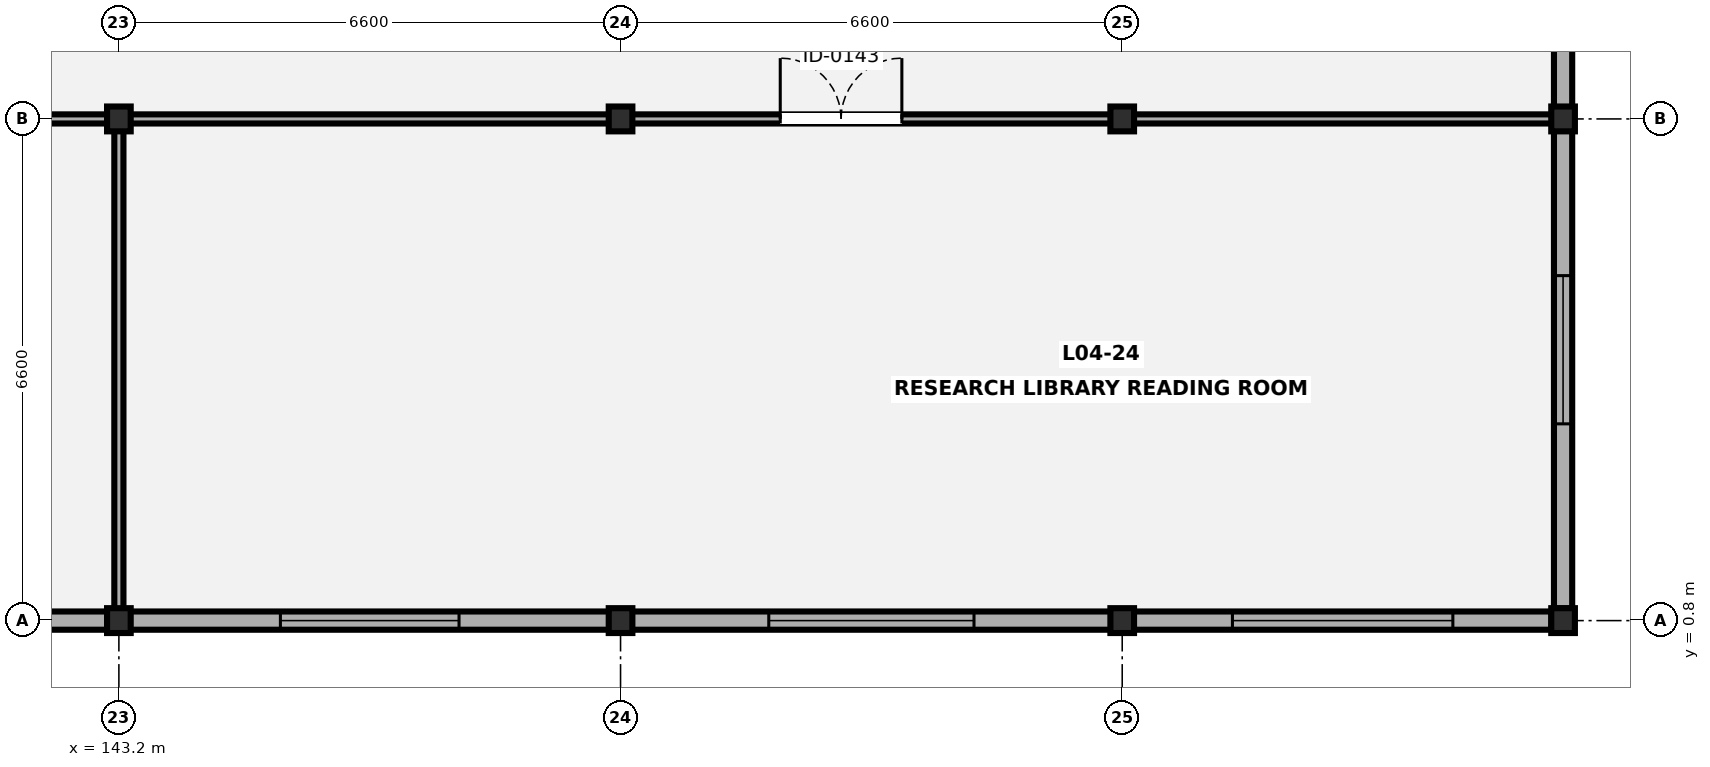
"""IFC4 building model, lengths in metres.
Left out: names, types, materials, properties, quantities, classifications, styles, units other than length and angle.
Written with IfcOpenShell. Run it as: python <this file> out.ifc"""

import sys

from ifc_helpers import new_model, si_unit, direction, frame, frame_2d, origin, origin_2d, place, context, subcontext, project, spatial, rectangle, i_section, extrude, element, fill, save


model = new_model("IFC4")
c1 = context("Model", 3, precision=1e-05, world=origin(), true_north=direction((0.0, 1.0)))
c2 = subcontext(c1, "Body", "Model", "MODEL_VIEW")
j1 = project(units=[si_unit("LENGTHUNIT", "METRE"), si_unit("PLANEANGLEUNIT", "RADIAN")], contexts=[c1])
p1 = place(None, origin())
s1 = spatial("IfcSite", under=j1, at=p1, CompositionType="ELEMENT")
p2 = place(p1, origin())
s2 = spatial("IfcBuilding", under=s1, at=p2, CompositionType="ELEMENT")
p3 = place(p2, frame((0.0, 0.0, 17.5)))
s3 = spatial("IfcBuildingStorey", under=s2, at=p3, CompositionType="ELEMENT", Elevation=17.5)
for number, where, z_axis, x_axis in (
    (1, (143.2, 0.8, 0.0), (0.0, 0.0, 1.0), (1.0, 0.0, 0.0)),
    (2, (143.2, 7.4, 0.0), (0.0, 0.0, 1.0), (1.0, 0.0, 0.0)),
    (3, (149.8, 0.8, 0.0), (0.0, 0.0, 1.0), (1.0, 0.0, 0.0)),
    (4, (149.8, 7.4, 0.0), (0.0, 0.0, 1.0), (1.0, 0.0, 0.0)),
    (5, (156.4, 0.8, 0.0), (0.0, 0.0, 1.0), (1.0, 0.0, 0.0)),
    (6, (156.4, 7.4, 0.0), (0.0, 0.0, 1.0), (1.0, 0.0, 0.0)),
    (7, (162.2, 0.8, 0.0), (0.0, 0.0, 1.0), (1.0, 0.0, 0.0)),
    (8, (162.2, 7.4, 0.0), (0.0, 0.0, 1.0), (1.0, 0.0, 0.0)),
):
    element("IfcColumn", number, at=place(p3, frame(where, z_axis=z_axis, x_axis=x_axis)), inside=s3, PredefinedType="COLUMN", context=c2, shape_type="SweptSolid", body=[
        extrude(i_section(OverallWidth=0.311, OverallDepth=0.327, WebThickness=0.016, FlangeThickness=0.025, FilletRadius=0.017, at=origin_2d()), origin(), (0.0, 0.0, 1.0), 4.2),
    ])
p4 = place(p3, frame((162.2, 20.438, 0.0), z_axis=(0.0, 0.0, 1.0), x_axis=(0.0, -1.0, 0.0)))
e9 = element("IfcWall", 9, at=p4, inside=s3, PredefinedType="SOLIDWALL", context=c2, shape_type="SweptSolid", body=[
    extrude(rectangle(XDim=19.477, YDim=0.24, at=frame_2d((9.739, 0.0))), origin(), (0.0, 0.0, 1.0), 3.372),
])
p5 = place(p4, frame((2.4, 0.0, 0.85)))
e10 = element("IfcOpeningElement", 10, at=p5, cuts=e9, PredefinedType="OPENING", context=c2, shape_type="SweptSolid", body=[
    extrude(rectangle(XDim=1.55, YDim=1.4, at=frame_2d((0.775, 0.7))), frame((0.0, 0.13, 0.0), z_axis=(0.0, -1.0, 0.0), x_axis=(1.0, 0.0, 0.0)), (0.0, 0.0, 1.0), 0.26),
])
p6 = place(p4, frame((15.1, 0.0, 0.85)))
e11 = element("IfcOpeningElement", 11, at=p6, cuts=e9, PredefinedType="OPENING", context=c2, shape_type="SweptSolid", body=[
    extrude(rectangle(XDim=1.95, YDim=1.5, at=frame_2d((0.975, 0.75))), frame((0.0, 0.13, 0.0), z_axis=(0.0, -1.0, 0.0), x_axis=(1.0, 0.0, 0.0)), (0.0, 0.0, 1.0), 0.26),
])
p7 = place(p3, frame((162.046, 0.8, 0.0), z_axis=(0.0, 0.0, 1.0), x_axis=(-1.0, 0.0, 0.0)))
e12 = element("IfcWall", 12, at=p7, inside=s3, PredefinedType="SOLIDWALL", context=c2, shape_type="SweptSolid", body=[
    extrude(rectangle(XDim=58.293, YDim=0.24, at=frame_2d((29.146, 0.0))), origin(), (0.0, 0.0, 1.0), 3.505),
])
p8 = place(p7, frame((53.896, 0.0, 0.85)))
e13 = element("IfcOpeningElement", 13, at=p8, cuts=e12, PredefinedType="OPENING", context=c2, shape_type="SweptSolid", body=[
    extrude(rectangle(XDim=2.5, YDim=1.25, at=frame_2d((1.25, 0.625))), frame((0.0, 0.13, 0.0), z_axis=(0.0, -1.0, 0.0), x_axis=(1.0, 0.0, 0.0)), (0.0, 0.0, 1.0), 0.26),
])
p9 = place(p7, frame((48.096, 0.0, 0.85)))
e14 = element("IfcOpeningElement", 14, at=p9, cuts=e12, PredefinedType="OPENING", context=c2, shape_type="SweptSolid", body=[
    extrude(rectangle(XDim=0.9, YDim=1.35, at=frame_2d((0.45, 0.675))), frame((0.0, 0.13, 0.0), z_axis=(0.0, -1.0, 0.0), x_axis=(1.0, 0.0, 0.0)), (0.0, 0.0, 1.0), 0.26),
])
p10 = place(p7, frame((41.421, 0.0, 0.85)))
e15 = element("IfcOpeningElement", 15, at=p10, cuts=e12, PredefinedType="OPENING", context=c2, shape_type="SweptSolid", body=[
    extrude(rectangle(XDim=1.05, YDim=1.35, at=frame_2d((0.525, 0.675))), frame((0.0, 0.13, 0.0), z_axis=(0.0, -1.0, 0.0), x_axis=(1.0, 0.0, 0.0)), (0.0, 0.0, 1.0), 0.26),
])
p11 = place(p7, frame((34.671, 0.0, 0.85)))
e16 = element("IfcOpeningElement", 16, at=p11, cuts=e12, PredefinedType="OPENING", context=c2, shape_type="SweptSolid", body=[
    extrude(rectangle(XDim=1.35, YDim=1.5, at=frame_2d((0.675, 0.75))), frame((0.0, 0.13, 0.0), z_axis=(0.0, -1.0, 0.0), x_axis=(1.0, 0.0, 0.0)), (0.0, 0.0, 1.0), 0.26),
])
p12 = place(p7, frame((27.947, 0.0, 0.85)))
e17 = element("IfcOpeningElement", 17, at=p12, cuts=e12, PredefinedType="OPENING", context=c2, shape_type="SweptSolid", body=[
    extrude(rectangle(XDim=1.6, YDim=1.5, at=frame_2d((0.8, 0.75))), frame((0.0, 0.13, 0.0), z_axis=(0.0, -1.0, 0.0), x_axis=(1.0, 0.0, 0.0)), (0.0, 0.0, 1.0), 0.26),
])
p13 = place(p7, frame((21.171, 0.0, 0.85)))
e18 = element("IfcOpeningElement", 18, at=p13, cuts=e12, PredefinedType="OPENING", context=c2, shape_type="SweptSolid", body=[
    extrude(rectangle(XDim=1.95, YDim=1.5, at=frame_2d((0.975, 0.75))), frame((0.0, 0.13, 0.0), z_axis=(0.0, -1.0, 0.0), x_axis=(1.0, 0.0, 0.0)), (0.0, 0.0, 1.0), 0.26),
])
p14 = place(p7, frame((14.372, 0.0, 0.85)))
e19 = element("IfcOpeningElement", 19, at=p14, cuts=e12, PredefinedType="OPENING", context=c2, shape_type="SweptSolid", body=[
    extrude(rectangle(XDim=2.35, YDim=1.5, at=frame_2d((1.175, 0.75))), frame((0.0, 0.13, 0.0), z_axis=(0.0, -1.0, 0.0), x_axis=(1.0, 0.0, 0.0)), (0.0, 0.0, 1.0), 0.26),
])
p15 = place(p7, frame((7.596, 0.0, 0.85)))
e20 = element("IfcOpeningElement", 20, at=p15, cuts=e12, PredefinedType="OPENING", context=c2, shape_type="SweptSolid", body=[
    extrude(rectangle(XDim=2.7, YDim=1.35, at=frame_2d((1.35, 0.675))), frame((0.0, 0.13, 0.0), z_axis=(0.0, -1.0, 0.0), x_axis=(1.0, 0.0, 0.0)), (0.0, 0.0, 1.0), 0.26),
])
p16 = place(p7, frame((1.296, 0.0, 0.85)))
e21 = element("IfcOpeningElement", 21, at=p16, cuts=e12, PredefinedType="OPENING", context=c2, shape_type="SweptSolid", body=[
    extrude(rectangle(XDim=2.9, YDim=1.35, at=frame_2d((1.45, 0.675))), frame((0.0, 0.13, 0.0), z_axis=(0.0, -1.0, 0.0), x_axis=(1.0, 0.0, 0.0)), (0.0, 0.0, 1.0), 0.26),
])
p17 = place(p3, frame((136.6, 7.4, 0.0), z_axis=(0.0, 0.0, 1.0), x_axis=(1.0, 0.0, 0.0)))
e22 = element("IfcWall", 22, at=p17, inside=s3, PredefinedType="PARTITIONING", context=c2, shape_type="SweptSolid", body=[
    extrude(rectangle(XDim=6.6, YDim=0.12, at=frame_2d((3.3, 0.0))), origin(), (0.0, 0.0, 1.0), 3.293),
])
p18 = place(p17, frame((2.575, 0.0, 0.0)))
e23 = element("IfcOpeningElement", 23, at=p18, cuts=e22, PredefinedType="OPENING", context=c2, shape_type="SweptSolid", body=[
    extrude(rectangle(XDim=1.45, YDim=2.12, at=frame_2d((0.725, 1.06))), frame((0.0, 0.07, 0.0), z_axis=(0.0, -1.0, 0.0), x_axis=(1.0, 0.0, 0.0)), (0.0, 0.0, 1.0), 0.14),
])
p19 = place(p3, frame((143.2, 0.8, 0.0), z_axis=(0.0, 0.0, 1.0), x_axis=(0.0, 1.0, 0.0)))
e24 = element("IfcWall", 24, at=p19, inside=s3, PredefinedType="PARTITIONING", context=c2, shape_type="SweptSolid", body=[
    extrude(rectangle(XDim=6.6, YDim=0.12, at=frame_2d((3.3, 0.0))), origin(), (0.0, 0.0, 1.0), 3.372),
])
p20 = place(p3, frame((143.202, 7.4, 0.0), z_axis=(0.0, 0.0, 1.0), x_axis=(1.0, 0.0, 0.0)))
e25 = element("IfcWall", 25, at=p20, inside=s3, PredefinedType="PARTITIONING", context=c2, shape_type="SweptSolid", body=[
    extrude(rectangle(XDim=18.998, YDim=0.12, at=frame_2d((9.499, 0.0))), origin(), (0.0, 0.0, 1.0), 3.293),
])
p21 = place(p20, frame((8.699, 0.0, 0.0)))
e26 = element("IfcOpeningElement", 26, at=p21, cuts=e25, PredefinedType="OPENING", context=c2, shape_type="SweptSolid", body=[
    extrude(rectangle(XDim=1.6, YDim=2.18, at=frame_2d((0.8, 1.09))), frame((0.0, 0.07, 0.0), z_axis=(0.0, -1.0, 0.0), x_axis=(1.0, 0.0, 0.0)), (0.0, 0.0, 1.0), 0.14),
])
p22 = place(p6, origin())
e27 = element("IfcWindow", 27, at=p22, inside=s3, PartitioningType="SINGLE_PANEL", PredefinedType="WINDOW", context=c2, shape_type="SweptSolid", body=[
    extrude(rectangle(XDim=1.95, YDim=1.5, at=frame_2d((0.975, 0.75))), frame((0.0, 0.03, 0.0), z_axis=(0.0, -1.0, 0.0), x_axis=(1.0, 0.0, 0.0)), (0.0, 0.0, 1.0), 0.06),
])
fill(e11, e27)
p23 = place(p14, origin())
e28 = element("IfcWindow", 28, at=p23, inside=s3, PartitioningType="SINGLE_PANEL", PredefinedType="WINDOW", context=c2, shape_type="SweptSolid", body=[
    extrude(rectangle(XDim=2.35, YDim=1.5, at=frame_2d((1.175, 0.75))), frame((0.0, 0.03, 0.0), z_axis=(0.0, -1.0, 0.0), x_axis=(1.0, 0.0, 0.0)), (0.0, 0.0, 1.0), 0.06),
])
fill(e19, e28)
p24 = place(p15, origin())
e29 = element("IfcWindow", 29, at=p24, inside=s3, PartitioningType="SINGLE_PANEL", PredefinedType="WINDOW", context=c2, shape_type="SweptSolid", body=[
    extrude(rectangle(XDim=2.7, YDim=1.35, at=frame_2d((1.35, 0.675))), frame((0.0, 0.03, 0.0), z_axis=(0.0, -1.0, 0.0), x_axis=(1.0, 0.0, 0.0)), (0.0, 0.0, 1.0), 0.06),
])
fill(e20, e29)
p25 = place(p16, origin())
e30 = element("IfcWindow", 30, at=p25, inside=s3, PartitioningType="SINGLE_PANEL", PredefinedType="WINDOW", context=c2, shape_type="SweptSolid", body=[
    extrude(rectangle(XDim=2.9, YDim=1.35, at=frame_2d((1.45, 0.675))), frame((0.0, 0.03, 0.0), z_axis=(0.0, -1.0, 0.0), x_axis=(1.0, 0.0, 0.0)), (0.0, 0.0, 1.0), 0.06),
])
fill(e21, e30)
p26 = place(p21, origin())
e31 = element("IfcDoor", 31, at=p26, inside=s3, OperationType="DOUBLE_DOOR_SINGLE_SWING", PredefinedType="DOOR", context=c2, shape_type="SweptSolid", body=[
    extrude(rectangle(XDim=1.6, YDim=2.18, at=frame_2d((0.8, 1.09))), frame((0.0, 0.025, 0.0), z_axis=(0.0, -1.0, 0.0), x_axis=(1.0, 0.0, 0.0)), (0.0, 0.0, 1.0), 0.05),
])
fill(e26, e31)
save(model, sys.argv[1])
